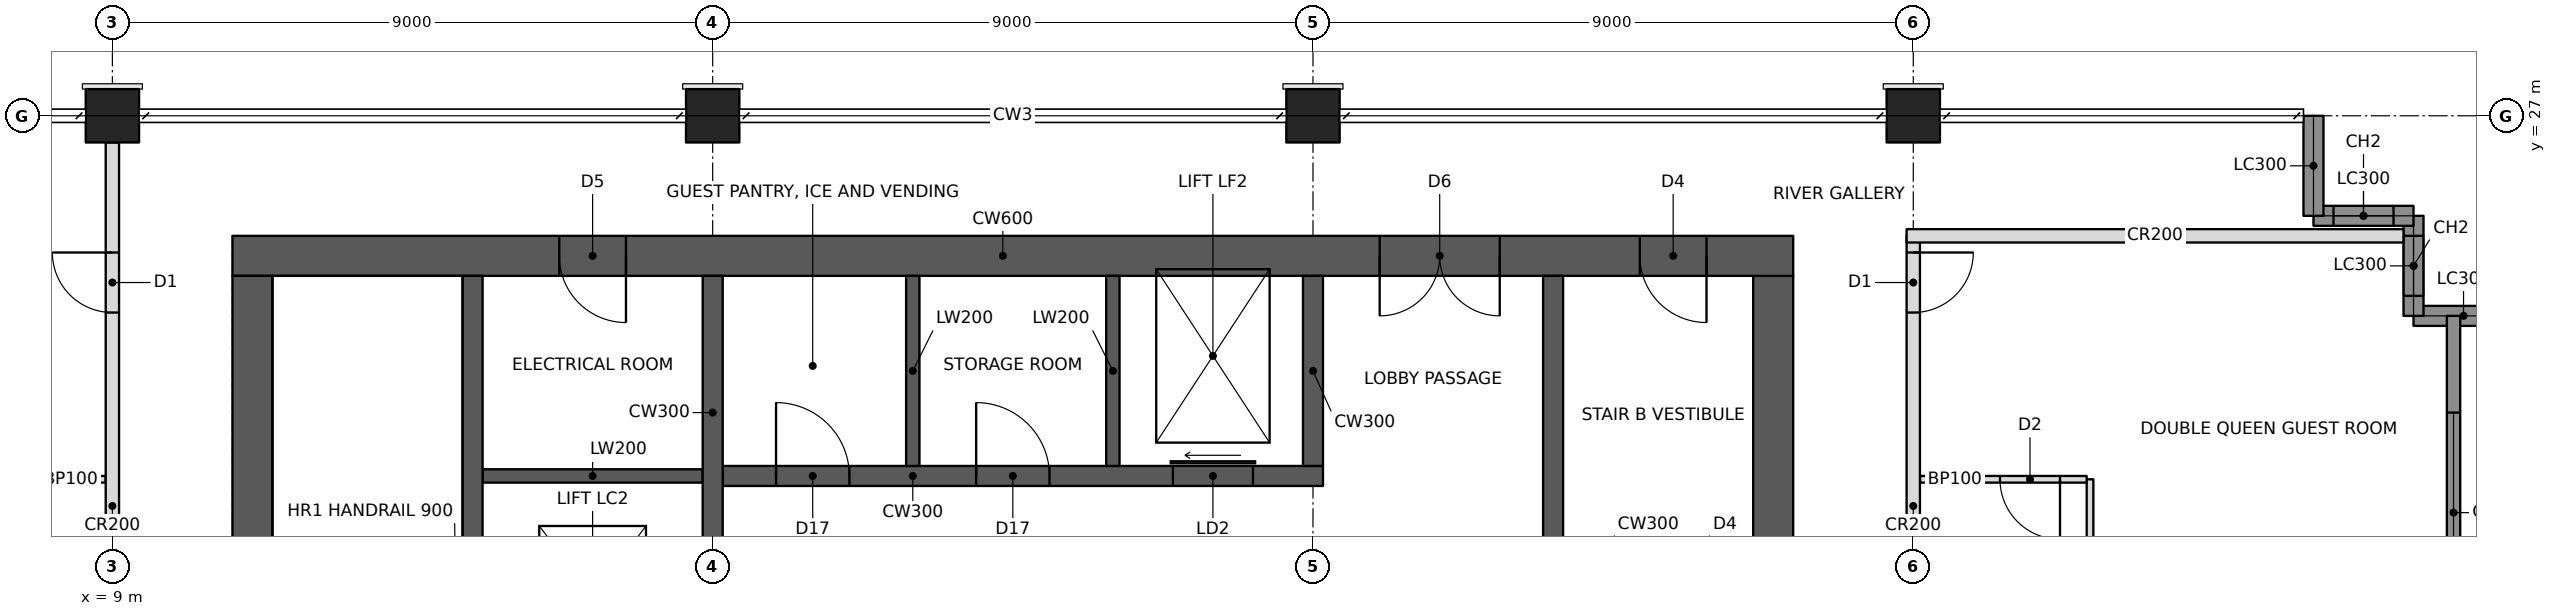
"""IFC4 building model, lengths in metres.
Left out: names, types, materials, properties, quantities, classifications, styles, units other than length and angle.
Written with IfcOpenShell. Run it as: python <this file> out.ifc"""

import sys

from ifc_helpers import new_model, si_unit, direction, frame, frame_2d, origin, origin_2d, place, context, subcontext, project, spatial, rectangle, hollow_rectangle, extrude, element, fill, save


model = new_model("IFC4")
c1 = context("Model", 3, precision=1e-05, world=origin(), true_north=direction((0.0, 1.0)))
c2 = subcontext(c1, "Body", "Model", "MODEL_VIEW")
j1 = project(units=[si_unit("LENGTHUNIT", "METRE"), si_unit("PLANEANGLEUNIT", "RADIAN")], contexts=[c1])
p1 = place(None, origin())
s1 = spatial("IfcSite", under=j1, at=p1, CompositionType="ELEMENT")
p2 = place(p1, origin())
s2 = spatial("IfcBuilding", under=s1, at=p2, CompositionType="ELEMENT")
p3 = place(p2, frame((0.0, 0.0, 170.6)))
s3 = spatial("IfcBuildingStorey", under=s2, at=p3, CompositionType="ELEMENT", Elevation=170.6)
for number, where, z_axis, x_axis in (
    (1, (9.0, 27.0, 0.0), (0.0, 0.0, 1.0), (1.0, 0.0, 0.0)),
    (2, (18.0, 27.0, 0.0), (0.0, 0.0, 1.0), (1.0, 0.0, 0.0)),
    (3, (27.0, 27.0, 0.0), (0.0, 0.0, 1.0), (1.0, 0.0, 0.0)),
    (4, (36.0, 27.0, 0.0), (0.0, 0.0, 1.0), (1.0, 0.0, 0.0)),
):
    element("IfcColumn", number, at=place(p3, frame(where, z_axis=z_axis, x_axis=x_axis)), inside=s3, PredefinedType="COLUMN", context=c2, shape_type="SweptSolid", body=[
        extrude(hollow_rectangle(XDim=0.8, YDim=0.8, WallThickness=0.07, at=origin_2d()), origin(), (0.0, 0.0, 1.0), 3.4),
    ])
p4 = place(p3, frame((10.8, 24.9, 0.0), z_axis=(0.0, 0.0, 1.0), x_axis=(1.0, 0.0, 0.0)))
e5 = element("IfcWall", 5, at=p4, inside=s3, PredefinedType="SHEAR", context=c2, shape_type="SweptSolid", body=[
    extrude(rectangle(XDim=23.4, YDim=0.6, at=frame_2d((11.7, 0.0))), origin(), (0.0, 0.0, 1.0), 3.4),
])
p5 = place(p4, frame((17.2, 0.0, 0.0)))
e6 = element("IfcOpeningElement", 6, at=p5, cuts=e5, PredefinedType="OPENING", context=c2, shape_type="SweptSolid", body=[
    extrude(rectangle(XDim=1.8, YDim=2.1, at=frame_2d((0.9, 1.05))), frame((0.0, 0.31, 0.0), z_axis=(0.0, -1.0, 0.0), x_axis=(1.0, 0.0, 0.0)), (0.0, 0.0, 1.0), 0.62),
])
p6 = place(p4, frame((21.1, 0.0, 0.0)))
e7 = element("IfcOpeningElement", 7, at=p6, cuts=e5, PredefinedType="OPENING", context=c2, shape_type="SweptSolid", body=[
    extrude(rectangle(XDim=1.0, YDim=2.1, at=frame_2d((0.5, 1.05))), frame((0.0, 0.31, 0.0), z_axis=(0.0, -1.0, 0.0), x_axis=(1.0, 0.0, 0.0)), (0.0, 0.0, 1.0), 0.62),
])
p7 = place(p4, frame((4.9, 0.0, 0.0)))
e8 = element("IfcOpeningElement", 8, at=p7, cuts=e5, PredefinedType="OPENING", context=c2, shape_type="SweptSolid", body=[
    extrude(rectangle(XDim=1.0, YDim=2.1, at=frame_2d((0.5, 1.05))), frame((0.0, 0.31, 0.0), z_axis=(0.0, -1.0, 0.0), x_axis=(1.0, 0.0, 0.0)), (0.0, 0.0, 1.0), 0.62),
])
for number, where, z_axis, x_axis in (
    (9, (11.1, 11.4, 0.0), (0.0, 0.0, 1.0), (0.0, 1.0, 0.0)),
    (10, (33.9, 11.4, 0.0), (0.0, 0.0, 1.0), (0.0, 1.0, 0.0)),
):
    element("IfcWall", number, at=place(p3, frame(where, z_axis=z_axis, x_axis=x_axis)), inside=s3, PredefinedType="SHEAR", context=c2, shape_type="SweptSolid", body=[
        extrude(rectangle(XDim=13.2, YDim=0.6, at=frame_2d((6.6, 0.0))), origin(), (0.0, 0.0, 1.0), 3.4),
    ])
p8 = place(p3, frame((14.4, 11.4, 0.0), z_axis=(0.0, 0.0, 1.0), x_axis=(0.0, 1.0, 0.0)))
e11 = element("IfcWall", 11, at=p8, inside=s3, PredefinedType="SHEAR", context=c2, shape_type="SweptSolid", body=[
    extrude(rectangle(XDim=13.2, YDim=0.3, at=frame_2d((6.6, 0.0))), origin(), (0.0, 0.0, 1.0), 3.4),
])
p9 = place(p3, frame((18.0, 11.4, 0.0), z_axis=(0.0, 0.0, 1.0), x_axis=(0.0, 1.0, 0.0)))
e12 = element("IfcWall", 12, at=p9, inside=s3, PredefinedType="SHEAR", context=c2, shape_type="SweptSolid", body=[
    extrude(rectangle(XDim=13.2, YDim=0.3, at=frame_2d((6.6, 0.0))), origin(), (0.0, 0.0, 1.0), 3.4),
])
p10 = place(p9, frame((3.6, 0.0, 0.0)))
e13 = element("IfcOpeningElement", 13, at=p10, cuts=e12, PredefinedType="OPENING", context=c2, shape_type="SweptSolid", body=[
    extrude(rectangle(XDim=1.0, YDim=2.1, at=frame_2d((0.5, 1.05))), frame((0.0, 0.16, 0.0), z_axis=(0.0, -1.0, 0.0), x_axis=(1.0, 0.0, 0.0)), (0.0, 0.0, 1.0), 0.32),
])
p11 = place(p9, frame((7.85, 0.0, 0.0)))
e14 = element("IfcOpeningElement", 14, at=p11, cuts=e12, PredefinedType="OPENING", context=c2, shape_type="SweptSolid", body=[
    extrude(rectangle(XDim=1.1, YDim=2.1, at=frame_2d((0.55, 1.05))), frame((0.0, 0.16, 0.0), z_axis=(0.0, -1.0, 0.0), x_axis=(1.0, 0.0, 0.0)), (0.0, 0.0, 1.0), 0.32),
])
p12 = place(p3, frame((18.15, 21.6, 0.0), z_axis=(0.0, 0.0, 1.0), x_axis=(1.0, 0.0, 0.0)))
e15 = element("IfcWall", 15, at=p12, inside=s3, PredefinedType="SHEAR", context=c2, shape_type="SweptSolid", body=[
    extrude(rectangle(XDim=9.0, YDim=0.3, at=frame_2d((4.5, 0.0))), origin(), (0.0, 0.0, 1.0), 3.4),
])
p13 = place(p12, frame((6.75, 0.0, 0.0)))
e16 = element("IfcOpeningElement", 16, at=p13, cuts=e15, PredefinedType="OPENING", context=c2, shape_type="SweptSolid", body=[
    extrude(rectangle(XDim=1.2, YDim=2.1, at=frame_2d((0.6, 1.05))), frame((0.0, 0.16, 0.0), z_axis=(0.0, -1.0, 0.0), x_axis=(1.0, 0.0, 0.0)), (0.0, 0.0, 1.0), 0.32),
])
p14 = place(p12, frame((0.8, 0.0, 0.0)))
e17 = element("IfcOpeningElement", 17, at=p14, cuts=e15, PredefinedType="OPENING", context=c2, shape_type="SweptSolid", body=[
    extrude(rectangle(XDim=1.1, YDim=2.1, at=frame_2d((0.55, 1.05))), frame((0.0, 0.16, 0.0), z_axis=(0.0, -1.0, 0.0), x_axis=(1.0, 0.0, 0.0)), (0.0, 0.0, 1.0), 0.32),
])
p15 = place(p12, frame((3.8, 0.0, 0.0)))
e18 = element("IfcOpeningElement", 18, at=p15, cuts=e15, PredefinedType="OPENING", context=c2, shape_type="SweptSolid", body=[
    extrude(rectangle(XDim=1.1, YDim=2.1, at=frame_2d((0.55, 1.05))), frame((0.0, 0.16, 0.0), z_axis=(0.0, -1.0, 0.0), x_axis=(1.0, 0.0, 0.0)), (0.0, 0.0, 1.0), 0.32),
])
p16 = place(p3, frame((27.0, 21.75, 0.0), z_axis=(0.0, 0.0, 1.0), x_axis=(0.0, 1.0, 0.0)))
e19 = element("IfcWall", 19, at=p16, inside=s3, PredefinedType="SHEAR", context=c2, shape_type="SweptSolid", body=[
    extrude(rectangle(XDim=2.85, YDim=0.3, at=frame_2d((1.425, 0.0))), origin(), (0.0, 0.0, 1.0), 3.4),
])
for number, where, z_axis, x_axis in (
    (20, (21.0, 21.75, 0.0), (0.0, 0.0, 1.0), (0.0, 1.0, 0.0)),
    (21, (24.0, 21.75, 0.0), (0.0, 0.0, 1.0), (0.0, 1.0, 0.0)),
):
    element("IfcWall", number, at=place(p3, frame(where, z_axis=z_axis, x_axis=x_axis)), inside=s3, PredefinedType="SHEAR", context=c2, shape_type="SweptSolid", body=[
        extrude(rectangle(XDim=2.85, YDim=0.2, at=frame_2d((1.425, 0.0))), origin(), (0.0, 0.0, 1.0), 3.4),
    ])
p17 = place(p3, frame((30.6, 11.4, 0.0), z_axis=(0.0, 0.0, 1.0), x_axis=(0.0, 1.0, 0.0)))
e22 = element("IfcWall", 22, at=p17, inside=s3, PredefinedType="SHEAR", context=c2, shape_type="SweptSolid", body=[
    extrude(rectangle(XDim=13.2, YDim=0.3, at=frame_2d((6.6, 0.0))), origin(), (0.0, 0.0, 1.0), 3.4),
])
p18 = place(p3, frame((14.55, 21.6, 0.0), z_axis=(0.0, 0.0, 1.0), x_axis=(1.0, 0.0, 0.0)))
e23 = element("IfcWall", 23, at=p18, inside=s3, PredefinedType="SHEAR", context=c2, shape_type="SweptSolid", body=[
    extrude(rectangle(XDim=3.3, YDim=0.2, at=frame_2d((1.65, 0.0))), origin(), (0.0, 0.0, 1.0), 3.4),
])
p19 = place(p3, frame((45.0, 24.0, 0.0), z_axis=(0.0, 0.0, 1.0), x_axis=(-1.0, 0.0, 0.0)))
e24 = element("IfcWall", 24, at=p19, inside=s3, PredefinedType="SOLIDWALL", context=c2, shape_type="SweptSolid", body=[
    extrude(rectangle(XDim=1.5, YDim=0.3, at=frame_2d((0.75, 0.0))), origin(), (0.0, 0.0, 1.0), 2.42),
])
p20 = place(p3, frame((43.5, 24.0, 0.0), z_axis=(0.0, 0.0, 1.0), x_axis=(0.0, 1.0, 0.0)))
e25 = element("IfcWall", 25, at=p20, inside=s3, PredefinedType="SOLIDWALL", context=c2, shape_type="SweptSolid", body=[
    extrude(rectangle(XDim=1.5, YDim=0.3, at=frame_2d((0.75, 0.0))), origin(), (0.0, 0.0, 1.0), 3.2),
])
p21 = place(p20, frame((0.3, 0.0, 0.6)))
e26 = element("IfcOpeningElement", 26, at=p21, cuts=e25, PredefinedType="OPENING", context=c2, shape_type="SweptSolid", body=[
    extrude(rectangle(XDim=0.9, YDim=2.2, at=frame_2d((0.45, 1.1))), frame((0.0, 0.16, 0.0), z_axis=(0.0, -1.0, 0.0), x_axis=(1.0, 0.0, 0.0)), (0.0, 0.0, 1.0), 0.32),
])
p22 = place(p3, frame((43.5, 25.5, 0.0), z_axis=(0.0, 0.0, 1.0), x_axis=(-1.0, 0.0, 0.0)))
e27 = element("IfcWall", 27, at=p22, inside=s3, PredefinedType="SOLIDWALL", context=c2, shape_type="SweptSolid", body=[
    extrude(rectangle(XDim=1.5, YDim=0.3, at=frame_2d((0.75, 0.0))), origin(), (0.0, 0.0, 1.0), 3.2),
])
p23 = place(p22, frame((0.3, 0.0, 0.6)))
e28 = element("IfcOpeningElement", 28, at=p23, cuts=e27, PredefinedType="OPENING", context=c2, shape_type="SweptSolid", body=[
    extrude(rectangle(XDim=0.9, YDim=2.2, at=frame_2d((0.45, 1.1))), frame((0.0, 0.16, 0.0), z_axis=(0.0, -1.0, 0.0), x_axis=(1.0, 0.0, 0.0)), (0.0, 0.0, 1.0), 0.32),
])
p24 = place(p3, frame((42.0, 25.5, 0.0), z_axis=(0.0, 0.0, 1.0), x_axis=(0.0, 1.0, 0.0)))
e29 = element("IfcWall", 29, at=p24, inside=s3, PredefinedType="SOLIDWALL", context=c2, shape_type="SweptSolid", body=[
    extrude(rectangle(XDim=1.5, YDim=0.3, at=frame_2d((0.75, 0.0))), origin(), (0.0, 0.0, 1.0), 2.42),
])
p25 = place(p3, frame((9.0, 18.4, 0.0), z_axis=(0.0, 0.0, 1.0), x_axis=(0.0, 1.0, 0.0)))
e30 = element("IfcWall", 30, at=p25, inside=s3, PredefinedType="PARTITIONING", context=c2, shape_type="SweptSolid", body=[
    extrude(rectangle(XDim=8.2, YDim=0.2, at=frame_2d((4.1, 0.0))), origin(), (0.0, 0.0, 1.0), 2.405),
])
p26 = place(p25, frame((5.65, 0.0, 0.0)))
e31 = element("IfcOpeningElement", 31, at=p26, cuts=e30, PredefinedType="OPENING", context=c2, shape_type="SweptSolid", body=[
    extrude(rectangle(XDim=0.9, YDim=2.1, at=frame_2d((0.45, 1.05))), frame((0.0, 0.11, 0.0), z_axis=(0.0, -1.0, 0.0), x_axis=(1.0, 0.0, 0.0)), (0.0, 0.0, 1.0), 0.22),
])
p27 = place(p3, frame((36.0, 18.4, 0.0), z_axis=(0.0, 0.0, 1.0), x_axis=(0.0, 1.0, 0.0)))
e32 = element("IfcWall", 32, at=p27, inside=s3, PredefinedType="PARTITIONING", context=c2, shape_type="SweptSolid", body=[
    extrude(rectangle(XDim=6.8, YDim=0.2, at=frame_2d((3.4, 0.0))), origin(), (0.0, 0.0, 1.0), 2.405),
])
p28 = place(p27, frame((5.65, 0.0, 0.0)))
e33 = element("IfcOpeningElement", 33, at=p28, cuts=e32, PredefinedType="OPENING", context=c2, shape_type="SweptSolid", body=[
    extrude(rectangle(XDim=0.9, YDim=2.1, at=frame_2d((0.45, 1.05))), frame((0.0, 0.11, 0.0), z_axis=(0.0, -1.0, 0.0), x_axis=(1.0, 0.0, 0.0)), (0.0, 0.0, 1.0), 0.22),
])
p29 = place(p3, frame((35.9, 25.2, 0.0), z_axis=(0.0, 0.0, 1.0), x_axis=(1.0, 0.0, 0.0)))
e34 = element("IfcWall", 34, at=p29, inside=s3, PredefinedType="PARTITIONING", context=c2, shape_type="SweptSolid", body=[
    extrude(rectangle(XDim=7.45, YDim=0.2, at=frame_2d((3.725, 0.0))), origin(), (0.0, 0.0, 1.0), 2.404),
])
p30 = place(p3, frame((8.9, 21.55, 0.0), z_axis=(0.0, 0.0, 1.0), x_axis=(-1.0, 0.0, 0.0)))
e35 = element("IfcWall", 35, at=p30, inside=s3, PredefinedType="PARTITIONING", context=c2, shape_type="SweptSolid", body=[
    extrude(rectangle(XDim=2.5, YDim=0.1, at=frame_2d((1.25, 0.0))), origin(), (0.0, 0.0, 1.0), 2.404),
])
p31 = place(p30, frame((1.2, 0.0, 0.0)))
e36 = element("IfcOpeningElement", 36, at=p31, cuts=e35, PredefinedType="OPENING", context=c2, shape_type="SweptSolid", body=[
    extrude(rectangle(XDim=0.9, YDim=2.1, at=frame_2d((0.45, 1.05))), frame((0.0, 0.06, 0.0), z_axis=(0.0, -1.0, 0.0), x_axis=(1.0, 0.0, 0.0)), (0.0, 0.0, 1.0), 0.12),
])
p32 = place(p3, frame((38.65, 18.1, 0.0), z_axis=(0.0, 0.0, 1.0), x_axis=(0.0, 1.0, 0.0)))
e37 = element("IfcWall", 37, at=p32, inside=s3, PredefinedType="PARTITIONING", context=c2, shape_type="SweptSolid", body=[
    extrude(rectangle(XDim=3.45, YDim=0.1, at=frame_2d((1.725, 0.0))), origin(), (0.0, 0.0, 1.0), 2.404),
])
p33 = place(p3, frame((36.1, 21.55, 0.0), z_axis=(0.0, 0.0, 1.0), x_axis=(1.0, 0.0, 0.0)))
e38 = element("IfcWall", 38, at=p33, inside=s3, PredefinedType="PARTITIONING", context=c2, shape_type="SweptSolid", body=[
    extrude(rectangle(XDim=2.5, YDim=0.1, at=frame_2d((1.25, 0.0))), origin(), (0.0, 0.0, 1.0), 2.404),
])
p34 = place(p33, frame((1.2, 0.0, 0.0)))
e39 = element("IfcOpeningElement", 39, at=p34, cuts=e38, PredefinedType="OPENING", context=c2, shape_type="SweptSolid", body=[
    extrude(rectangle(XDim=0.9, YDim=2.1, at=frame_2d((0.45, 1.05))), frame((0.0, 0.06, 0.0), z_axis=(0.0, -1.0, 0.0), x_axis=(1.0, 0.0, 0.0)), (0.0, 0.0, 1.0), 0.12),
])
p35 = place(p3, frame((44.1, 18.194, 0.0), z_axis=(0.0, 0.0, 1.0), x_axis=(0.0, 1.0, 0.0)))
e40 = element("IfcWall", 40, at=p35, inside=s3, PredefinedType="SOLIDWALL", context=c2, shape_type="SweptSolid", body=[
    extrude(rectangle(XDim=5.806, YDim=0.2, at=frame_2d((2.903, 0.0))), origin(), (0.0, 0.0, 1.0), 3.2),
])
p36 = place(p35, frame((1.356, 0.0, 0.6)))
e41 = element("IfcOpeningElement", 41, at=p36, cuts=e40, PredefinedType="OPENING", context=c2, shape_type="SweptSolid", body=[
    extrude(rectangle(XDim=3.0, YDim=2.2, at=frame_2d((1.5, 1.1))), frame((0.0, 0.11, 0.0), z_axis=(0.0, -1.0, 0.0), x_axis=(1.0, 0.0, 0.0)), (0.0, 0.0, 1.0), 0.22),
])
p37 = place(p21, origin())
e42 = element("IfcWindow", 42, at=p37, inside=s3, PartitioningType="SINGLE_PANEL", PredefinedType="WINDOW", context=c2, shape_type="SweptSolid", body=[
    extrude(rectangle(XDim=0.9, YDim=2.2, at=frame_2d((0.45, 1.1))), frame((0.0, 0.03, 0.0), z_axis=(0.0, -1.0, 0.0), x_axis=(1.0, 0.0, 0.0)), (0.0, 0.0, 1.0), 0.06),
])
fill(e26, e42)
p38 = place(p23, origin())
e43 = element("IfcWindow", 43, at=p38, inside=s3, PartitioningType="SINGLE_PANEL", PredefinedType="WINDOW", context=c2, shape_type="SweptSolid", body=[
    extrude(rectangle(XDim=0.9, YDim=2.2, at=frame_2d((0.45, 1.1))), frame((0.0, 0.03, 0.0), z_axis=(0.0, -1.0, 0.0), x_axis=(1.0, 0.0, 0.0)), (0.0, 0.0, 1.0), 0.06),
])
fill(e28, e43)
p39 = place(p36, origin())
e44 = element("IfcWindow", 44, at=p39, inside=s3, PartitioningType="TRIPLE_PANEL_VERTICAL", PredefinedType="WINDOW", context=c2, shape_type="SweptSolid", body=[
    extrude(rectangle(XDim=3.0, YDim=2.2, at=frame_2d((1.5, 1.1))), frame((0.0, 0.03, 0.0), z_axis=(0.0, -1.0, 0.0), x_axis=(1.0, 0.0, 0.0)), (0.0, 0.0, 1.0), 0.06),
])
fill(e41, e44)
p40 = place(p26, origin())
e45 = element("IfcDoor", 45, at=p40, inside=s3, OperationType="SINGLE_SWING_RIGHT", PredefinedType="DOOR", context=c2, shape_type="SweptSolid", body=[
    extrude(rectangle(XDim=0.9, YDim=2.1, at=frame_2d((0.45, 1.05))), frame((0.0, 0.025, 0.0), z_axis=(0.0, -1.0, 0.0), x_axis=(1.0, 0.0, 0.0)), (0.0, 0.0, 1.0), 0.05),
])
fill(e31, e45)
p41 = place(p34, frame((0.9, 0.0, 0.0), z_axis=(0.0, 0.0, 1.0), x_axis=(-1.0, 0.0, 0.0)))
e46 = element("IfcDoor", 46, at=p41, inside=s3, OperationType="SINGLE_SWING_LEFT", PredefinedType="DOOR", context=c2, shape_type="SweptSolid", body=[
    extrude(rectangle(XDim=0.9, YDim=2.1, at=frame_2d((0.45, 1.05))), frame((0.0, 0.025, 0.0), z_axis=(0.0, -1.0, 0.0), x_axis=(1.0, 0.0, 0.0)), (0.0, 0.0, 1.0), 0.05),
])
fill(e39, e46)
p42 = place(p28, frame((0.9, 0.0, 0.0), z_axis=(0.0, 0.0, 1.0), x_axis=(-1.0, 0.0, 0.0)))
e47 = element("IfcDoor", 47, at=p42, inside=s3, OperationType="SINGLE_SWING_LEFT", PredefinedType="DOOR", context=c2, shape_type="SweptSolid", body=[
    extrude(rectangle(XDim=0.9, YDim=2.1, at=frame_2d((0.45, 1.05))), frame((0.0, 0.025, 0.0), z_axis=(0.0, -1.0, 0.0), x_axis=(1.0, 0.0, 0.0)), (0.0, 0.0, 1.0), 0.05),
])
fill(e33, e47)
p43 = place(p5, frame((1.8, 0.0, 0.0), z_axis=(0.0, 0.0, 1.0), x_axis=(-1.0, 0.0, 0.0)))
e48 = element("IfcDoor", 48, at=p43, inside=s3, OperationType="DOUBLE_DOOR_SINGLE_SWING", PredefinedType="DOOR", context=c2, shape_type="SweptSolid", body=[
    extrude(rectangle(XDim=1.8, YDim=2.1, at=frame_2d((0.9, 1.05))), frame((0.0, 0.025, 0.0), z_axis=(0.0, -1.0, 0.0), x_axis=(1.0, 0.0, 0.0)), (0.0, 0.0, 1.0), 0.05),
])
fill(e6, e48)
p44 = place(p6, frame((1.0, 0.0, 0.0), z_axis=(0.0, 0.0, 1.0), x_axis=(-1.0, 0.0, 0.0)))
e49 = element("IfcDoor", 49, at=p44, inside=s3, OperationType="SINGLE_SWING_LEFT", PredefinedType="DOOR", context=c2, shape_type="SweptSolid", body=[
    extrude(rectangle(XDim=1.0, YDim=2.1, at=frame_2d((0.5, 1.05))), frame((0.0, 0.025, 0.0), z_axis=(0.0, -1.0, 0.0), x_axis=(1.0, 0.0, 0.0)), (0.0, 0.0, 1.0), 0.05),
])
fill(e7, e49)
p45 = place(p7, frame((1.0, 0.0, 0.0), z_axis=(0.0, 0.0, 1.0), x_axis=(-1.0, 0.0, 0.0)))
e50 = element("IfcDoor", 50, at=p45, inside=s3, OperationType="SINGLE_SWING_LEFT", PredefinedType="DOOR", context=c2, shape_type="SweptSolid", body=[
    extrude(rectangle(XDim=1.0, YDim=2.1, at=frame_2d((0.5, 1.05))), frame((0.0, 0.025, 0.0), z_axis=(0.0, -1.0, 0.0), x_axis=(1.0, 0.0, 0.0)), (0.0, 0.0, 1.0), 0.05),
])
fill(e8, e50)
p46 = place(p13, origin())
e51 = element("IfcDoor", 51, at=p46, inside=s3, OperationType="SLIDING_TO_LEFT", PredefinedType="DOOR", context=c2, shape_type="SweptSolid", body=[
    extrude(rectangle(XDim=1.2, YDim=2.1, at=frame_2d((0.6, 1.05))), frame((0.0, 0.025, 0.0), z_axis=(0.0, -1.0, 0.0), x_axis=(1.0, 0.0, 0.0)), (0.0, 0.0, 1.0), 0.05),
])
fill(e16, e51)
p47 = place(p14, origin())
e52 = element("IfcDoor", 52, at=p47, inside=s3, OperationType="SINGLE_SWING_LEFT", PredefinedType="DOOR", context=c2, shape_type="SweptSolid", body=[
    extrude(rectangle(XDim=1.1, YDim=2.1, at=frame_2d((0.55, 1.05))), frame((0.0, 0.025, 0.0), z_axis=(0.0, -1.0, 0.0), x_axis=(1.0, 0.0, 0.0)), (0.0, 0.0, 1.0), 0.05),
])
fill(e17, e52)
p48 = place(p15, origin())
e53 = element("IfcDoor", 53, at=p48, inside=s3, OperationType="SINGLE_SWING_LEFT", PredefinedType="DOOR", context=c2, shape_type="SweptSolid", body=[
    extrude(rectangle(XDim=1.1, YDim=2.1, at=frame_2d((0.55, 1.05))), frame((0.0, 0.025, 0.0), z_axis=(0.0, -1.0, 0.0), x_axis=(1.0, 0.0, 0.0)), (0.0, 0.0, 1.0), 0.05),
])
fill(e18, e53)
save(model, sys.argv[1])
